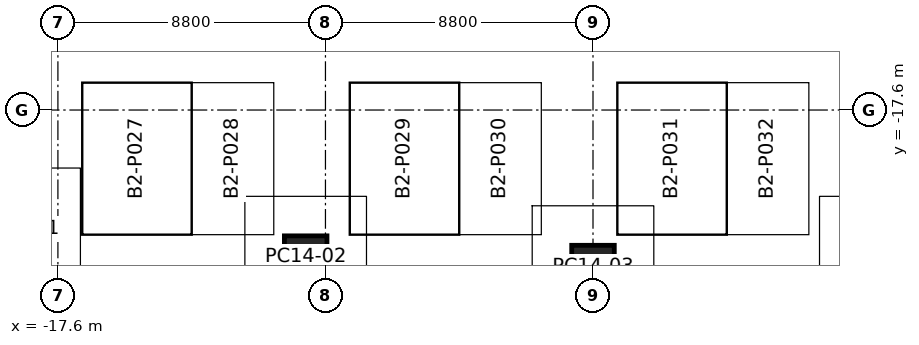
"""IFC4 building model, lengths in metres.
Left out: names, types, materials, properties, quantities, classifications, styles, units other than length and angle.
Written with IfcOpenShell. Run it as: python <this file> out.ifc"""

import sys

from ifc_helpers import new_model, si_unit, direction, frame, origin, origin_2d, place, context, subcontext, project, spatial, rectangle, extrude, element, save


model = new_model("IFC4")
c1 = context("Model", 3, precision=1e-05, world=origin(), true_north=direction((0.0, 1.0)))
c2 = subcontext(c1, "Body", "Model", "MODEL_VIEW")
j1 = project(units=[si_unit("LENGTHUNIT", "METRE"), si_unit("PLANEANGLEUNIT", "RADIAN")], contexts=[c1])
p1 = place(None, origin())
s1 = spatial("IfcSite", under=j1, at=p1, CompositionType="ELEMENT")
p2 = place(p1, origin())
s2 = spatial("IfcBuilding", under=s1, at=p2, CompositionType="ELEMENT")
p3 = place(p2, frame((0.0, 0.0, -9.0)))
s3 = spatial("IfcBuildingStorey", under=s2, at=p3, CompositionType="ELEMENT", Elevation=-9.0)
for number, where, z_axis, x_axis in (
    (1, (-9.45, -22.439, 0.0), (0.0, 0.0, 1.0), (-0.998, 0.066, 0.0)),
    (2, (0.0, -22.75, 0.0), (0.0, 0.0, 1.0), (1.0, 0.0, 0.0)),
):
    element("IfcColumn", number, at=place(p3, frame(where, z_axis=z_axis, x_axis=x_axis)), inside=s3, PredefinedType="COLUMN", context=c2, shape_type="SweptSolid", body=[
        extrude(rectangle(XDim=1.4, YDim=1.4, at=origin_2d()), origin(), (0.0, 0.0, 1.0), 4.5),
    ])
save(model, sys.argv[1])
